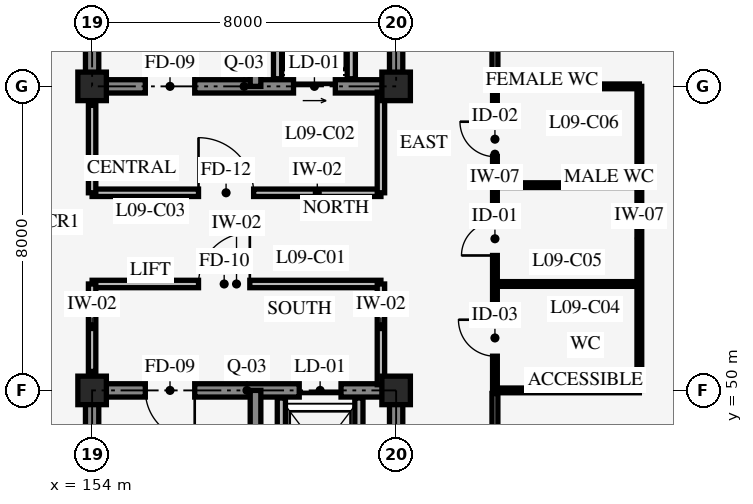
"""IFC4 building model, lengths in metres.
Left out: names, types, materials, properties, quantities, classifications, styles, units other than length and angle.
Written with IfcOpenShell. Run it as: python <this file> out.ifc"""

import sys

from ifc_helpers import new_model, si_unit, direction, frame, frame_2d, origin, origin_2d, place, context, subcontext, project, spatial, rectangle, extrude, element, fill, save


model = new_model("IFC4")
c1 = context("Model", 3, precision=1e-05, world=origin(), true_north=direction((0.0, 1.0)))
c2 = subcontext(c1, "Body", "Model", "MODEL_VIEW")
j1 = project(units=[si_unit("LENGTHUNIT", "METRE"), si_unit("PLANEANGLEUNIT", "RADIAN")], contexts=[c1])
p1 = place(None, origin())
s1 = spatial("IfcSite", under=j1, at=p1, CompositionType="ELEMENT")
p2 = place(p1, origin())
s2 = spatial("IfcBuilding", under=s1, at=p2, CompositionType="ELEMENT")
p3 = place(p2, frame((0.0, 0.0, 36.0)))
s3 = spatial("IfcBuildingStorey", under=s2, at=p3, CompositionType="ELEMENT", Elevation=36.0)
p4 = place(p3, frame((162.0, 42.0, 0.0), z_axis=(0.0, 0.0, 1.0), x_axis=(0.0, 1.0, 0.0)))
e1 = element("IfcWall", 1, at=p4, inside=s3, PredefinedType="SHEAR", context=c2, shape_type="SweptSolid", body=[
    extrude(rectangle(XDim=8.0, YDim=0.35, at=frame_2d((4.0, 0.0))), origin(), (0.0, 0.0, 1.0), 3.95),
])
p5 = place(p4, frame((3.175, 0.0, 0.0)))
e2 = element("IfcOpeningElement", 2, at=p5, cuts=e1, PredefinedType="OPENING", context=c2, shape_type="SweptSolid", body=[
    extrude(rectangle(XDim=1.05, YDim=2.2, at=frame_2d((0.525, 1.1))), frame((0.0, 0.185, 0.0), z_axis=(0.0, -1.0, 0.0), x_axis=(1.0, 0.0, 0.0)), (0.0, 0.0, 1.0), 0.37),
])
p6 = place(p3, frame((162.0, 50.0, 0.0), z_axis=(0.0, 0.0, 1.0), x_axis=(-1.0, 0.0, 0.0)))
e3 = element("IfcWall", 3, at=p6, inside=s3, PredefinedType="SHEAR", context=c2, shape_type="SweptSolid", body=[
    extrude(rectangle(XDim=8.0, YDim=0.35, at=frame_2d((4.0, 0.0))), origin(), (0.0, 0.0, 1.0), 3.95),
])
p7 = place(p6, frame((5.3, 0.0, 0.0)))
e4 = element("IfcOpeningElement", 4, at=p7, cuts=e3, PredefinedType="OPENING", context=c2, shape_type="SweptSolid", body=[
    extrude(rectangle(XDim=1.3, YDim=2.15, at=frame_2d((0.65, 1.075))), frame((0.0, 0.185, 0.0), z_axis=(0.0, -1.0, 0.0), x_axis=(1.0, 0.0, 0.0)), (0.0, 0.0, 1.0), 0.37),
])
p8 = place(p6, frame((1.45, 0.0, 0.0)))
e5 = element("IfcOpeningElement", 5, at=p8, cuts=e3, PredefinedType="OPENING", context=c2, shape_type="SweptSolid", body=[
    extrude(rectangle(XDim=1.1, YDim=2.2, at=frame_2d((0.55, 1.1))), frame((0.0, 0.185, 0.0), z_axis=(0.0, -1.0, 0.0), x_axis=(1.0, 0.0, 0.0)), (0.0, 0.0, 1.0), 0.37),
])
p9 = place(p3, frame((154.0, 50.0, 0.0), z_axis=(0.0, 0.0, 1.0), x_axis=(0.0, -1.0, 0.0)))
e6 = element("IfcWall", 6, at=p9, inside=s3, PredefinedType="SHEAR", context=c2, shape_type="SweptSolid", body=[
    extrude(rectangle(XDim=8.0, YDim=0.35, at=frame_2d((4.0, 0.0))), origin(), (0.0, 0.0, 1.0), 3.95),
])
p10 = place(p3, frame((158.3, 42.0, 0.0), z_axis=(0.0, 0.0, 1.0), x_axis=(0.0, 1.0, 0.0)))
e7 = element("IfcWall", 7, at=p10, inside=s3, PredefinedType="SHEAR", context=c2, shape_type="SweptSolid", body=[
    extrude(rectangle(XDim=8.0, YDim=0.28, at=frame_2d((4.0, 0.0))), origin(), (0.0, 0.0, 1.0), 3.95),
])
p11 = place(p3, frame((154.0, 58.0, 0.0), z_axis=(0.0, 0.0, 1.0), x_axis=(1.0, 0.0, 0.0)))
e8 = element("IfcWall", 8, at=p11, inside=s3, PredefinedType="SHEAR", context=c2, shape_type="SweptSolid", body=[
    extrude(rectangle(XDim=8.0, YDim=0.35, at=frame_2d((4.0, 0.0))), origin(), (0.0, 0.0, 1.0), 3.95),
])
p12 = place(p11, frame((1.4, 0.0, 0.0)))
e9 = element("IfcOpeningElement", 9, at=p12, cuts=e8, PredefinedType="OPENING", context=c2, shape_type="SweptSolid", body=[
    extrude(rectangle(XDim=1.3, YDim=2.15, at=frame_2d((0.65, 1.075))), frame((0.0, 0.185, 0.0), z_axis=(0.0, -1.0, 0.0), x_axis=(1.0, 0.0, 0.0)), (0.0, 0.0, 1.0), 0.37),
])
p13 = place(p11, frame((5.3, 0.0, 0.0)))
e10 = element("IfcOpeningElement", 10, at=p13, cuts=e8, PredefinedType="OPENING", context=c2, shape_type="SweptSolid", body=[
    extrude(rectangle(XDim=1.1, YDim=2.2, at=frame_2d((0.55, 1.1))), frame((0.0, 0.185, 0.0), z_axis=(0.0, -1.0, 0.0), x_axis=(1.0, 0.0, 0.0)), (0.0, 0.0, 1.0), 0.37),
])
p14 = place(p3, frame((162.0, 58.0, 0.0), z_axis=(0.0, 0.0, 1.0), x_axis=(0.0, 1.0, 0.0)))
e11 = element("IfcWall", 11, at=p14, inside=s3, PredefinedType="SHEAR", context=c2, shape_type="SweptSolid", body=[
    extrude(rectangle(XDim=8.0, YDim=0.35, at=frame_2d((4.0, 0.0))), origin(), (0.0, 0.0, 1.0), 3.95),
])
p15 = place(p14, frame((3.275, 0.0, 0.0)))
e12 = element("IfcOpeningElement", 12, at=p15, cuts=e11, PredefinedType="OPENING", context=c2, shape_type="SweptSolid", body=[
    extrude(rectangle(XDim=1.05, YDim=2.2, at=frame_2d((0.525, 1.1))), frame((0.0, 0.185, 0.0), z_axis=(0.0, -1.0, 0.0), x_axis=(1.0, 0.0, 0.0)), (0.0, 0.0, 1.0), 0.37),
])
p16 = place(p14, frame((5.45, 0.0, 0.0)))
e13 = element("IfcOpeningElement", 13, at=p16, cuts=e11, PredefinedType="OPENING", context=c2, shape_type="SweptSolid", body=[
    extrude(rectangle(XDim=1.4, YDim=2.3, at=frame_2d((0.7, 1.15))), frame((0.0, 0.185, 0.0), z_axis=(0.0, -1.0, 0.0), x_axis=(1.0, 0.0, 0.0)), (0.0, 0.0, 1.0), 0.37),
])
p17 = place(p3, frame((154.0, 66.0, 0.0), z_axis=(0.0, 0.0, 1.0), x_axis=(0.0, -1.0, 0.0)))
e14 = element("IfcWall", 14, at=p17, inside=s3, PredefinedType="SHEAR", context=c2, shape_type="SweptSolid", body=[
    extrude(rectangle(XDim=8.0, YDim=0.35, at=frame_2d((4.0, 0.0))), origin(), (0.0, 0.0, 1.0), 3.95),
])
p18 = place(p3, frame((158.3, 58.0, 0.0), z_axis=(0.0, 0.0, 1.0), x_axis=(0.0, 1.0, 0.0)))
e15 = element("IfcWall", 15, at=p18, inside=s3, PredefinedType="SHEAR", context=c2, shape_type="SweptSolid", body=[
    extrude(rectangle(XDim=8.0, YDim=0.28, at=frame_2d((4.0, 0.0))), origin(), (0.0, 0.0, 1.0), 3.95),
])
for number, where, z_axis, x_axis in (
    (16, (154.0, 50.0, 0.0), (0.0, 0.0, 1.0), (1.0, 0.0, 0.0)),
    (17, (154.0, 58.0, 0.0), (0.0, 0.0, 1.0), (1.0, 0.0, 0.0)),
    (18, (162.0, 50.0, 0.0), (0.0, 0.0, 1.0), (1.0, 0.0, 0.0)),
    (19, (162.0, 58.0, 0.0), (0.0, 0.0, 1.0), (1.0, 0.0, 0.0)),
):
    element("IfcColumn", number, at=place(p3, frame(where, z_axis=z_axis, x_axis=x_axis)), inside=s3, PredefinedType="COLUMN", context=c2, shape_type="SweptSolid", body=[
        extrude(rectangle(XDim=0.75, YDim=0.75, at=origin_2d()), origin(), (0.0, 0.0, 1.0), 4.2),
    ])
for number, where, z_axis, x_axis in (
    (20, (158.98, 47.02, 0.0), (0.0, 0.0, 1.0), (0.0, 1.0, 0.0)),
    (21, (161.02, 47.02, 0.0), (0.0, 0.0, 1.0), (0.0, 1.0, 0.0)),
):
    element("IfcWall", number, at=place(p3, frame(where, z_axis=z_axis, x_axis=x_axis)), inside=s3, PredefinedType="STANDARD", context=c2, shape_type="SweptSolid", body=[
        extrude(rectangle(XDim=2.78, YDim=0.215, at=frame_2d((1.39, 0.0))), origin(), (0.0, 0.0, 1.0), 3.9),
    ])
for number, where, z_axis, x_axis in (
    (22, (160.82, 58.2, 0.0), (0.0, 0.0, 1.0), (0.0, 1.0, 0.0)),
    (23, (158.88, 58.2, 0.0), (0.0, 0.0, 1.0), (0.0, 1.0, 0.0)),
):
    element("IfcWall", number, at=place(p3, frame(where, z_axis=z_axis, x_axis=x_axis)), inside=s3, PredefinedType="STANDARD", context=c2, shape_type="SweptSolid", body=[
        extrude(rectangle(XDim=2.55, YDim=0.215, at=frame_2d((1.275, 0.0))), origin(), (0.0, 0.0, 1.0), 3.9),
    ])
p19 = place(p3, frame((154.0, 52.8, 0.0), z_axis=(0.0, 0.0, 1.0), x_axis=(1.0, 0.0, 0.0)))
e24 = element("IfcWall", 24, at=p19, inside=s3, PredefinedType="STANDARD", context=c2, shape_type="SweptSolid", body=[
    extrude(rectangle(XDim=7.6, YDim=0.195, at=frame_2d((3.8, 0.0))), origin(), (0.0, 0.0, 1.0), 3.9),
])
p20 = place(p19, frame((2.8, 0.0, 0.0)))
e25 = element("IfcOpeningElement", 25, at=p20, cuts=e24, PredefinedType="OPENING", context=c2, shape_type="SweptSolid", body=[
    extrude(rectangle(XDim=1.35, YDim=2.15, at=frame_2d((0.675, 1.075))), frame((0.0, 0.107, 0.0), z_axis=(0.0, -1.0, 0.0), x_axis=(1.0, 0.0, 0.0)), (0.0, 0.0, 1.0), 0.215),
])
p21 = place(p3, frame((161.6, 50.15, 0.0), z_axis=(0.0, 0.0, 1.0), x_axis=(0.0, 1.0, 0.0)))
e26 = element("IfcWall", 26, at=p21, inside=s3, PredefinedType="STANDARD", context=c2, shape_type="SweptSolid", body=[
    extrude(rectangle(XDim=2.65, YDim=0.195, at=frame_2d((1.325, 0.0))), origin(), (0.0, 0.0, 1.0), 3.14),
])
p22 = place(p3, frame((154.0, 50.5, 0.0), z_axis=(0.0, 0.0, 1.0), x_axis=(0.0, 1.0, 0.0)))
e27 = element("IfcWall", 27, at=p22, inside=s3, PredefinedType="STANDARD", context=c2, shape_type="SweptSolid", body=[
    extrude(rectangle(XDim=2.3, YDim=0.195, at=frame_2d((1.15, 0.0))), origin(), (0.0, 0.0, 1.0), 3.14),
])
p23 = place(p3, frame((154.0, 55.2, 0.0), z_axis=(0.0, 0.0, 1.0), x_axis=(1.0, 0.0, 0.0)))
e28 = element("IfcWall", 28, at=p23, inside=s3, PredefinedType="STANDARD", context=c2, shape_type="SweptSolid", body=[
    extrude(rectangle(XDim=7.6, YDim=0.195, at=frame_2d((3.8, 0.0))), origin(), (0.0, 0.0, 1.0), 3.9),
])
p24 = place(p23, frame((2.8, 0.0, 0.0)))
e29 = element("IfcOpeningElement", 29, at=p24, cuts=e28, PredefinedType="OPENING", context=c2, shape_type="SweptSolid", body=[
    extrude(rectangle(XDim=1.45, YDim=2.2, at=frame_2d((0.725, 1.1))), frame((0.0, 0.107, 0.0), z_axis=(0.0, -1.0, 0.0), x_axis=(1.0, 0.0, 0.0)), (0.0, 0.0, 1.0), 0.215),
])
p25 = place(p3, frame((161.6, 55.2, 0.0), z_axis=(0.0, 0.0, 1.0), x_axis=(0.0, 1.0, 0.0)))
e30 = element("IfcWall", 30, at=p25, inside=s3, PredefinedType="STANDARD", context=c2, shape_type="SweptSolid", body=[
    extrude(rectangle(XDim=2.65, YDim=0.195, at=frame_2d((1.325, 0.0))), origin(), (0.0, 0.0, 1.0), 3.14),
])
p26 = place(p3, frame((154.0, 55.2, 0.0), z_axis=(0.0, 0.0, 1.0), x_axis=(0.0, 1.0, 0.0)))
e31 = element("IfcWall", 31, at=p26, inside=s3, PredefinedType="STANDARD", context=c2, shape_type="SweptSolid", body=[
    extrude(rectangle(XDim=2.3, YDim=0.195, at=frame_2d((1.15, 0.0))), origin(), (0.0, 0.0, 1.0), 3.14),
])
p27 = place(p3, frame((164.6, 50.0, 0.0), z_axis=(0.0, 0.0, 1.0), x_axis=(0.0, 1.0, 0.0)))
e32 = element("IfcWall", 32, at=p27, inside=s3, PredefinedType="STANDARD", context=c2, shape_type="SweptSolid", body=[
    extrude(rectangle(XDim=8.0, YDim=0.125, at=frame_2d((4.0, 0.0))), origin(), (0.0, 0.0, 1.0), 3.9),
])
p28 = place(p27, frame((0.9, 0.0, 0.0)))
e33 = element("IfcOpeningElement", 33, at=p28, cuts=e32, PredefinedType="OPENING", context=c2, shape_type="SweptSolid", body=[
    extrude(rectangle(XDim=0.96, YDim=2.08, at=frame_2d((0.48, 1.04))), frame((0.0, 0.073, 0.0), z_axis=(0.0, -1.0, 0.0), x_axis=(1.0, 0.0, 0.0)), (0.0, 0.0, 1.0), 0.145),
])
p29 = place(p27, frame((3.55, 0.0, 0.0)))
e34 = element("IfcOpeningElement", 34, at=p29, cuts=e32, PredefinedType="OPENING", context=c2, shape_type="SweptSolid", body=[
    extrude(rectangle(XDim=0.88, YDim=2.05, at=frame_2d((0.44, 1.025))), frame((0.0, 0.073, 0.0), z_axis=(0.0, -1.0, 0.0), x_axis=(1.0, 0.0, 0.0)), (0.0, 0.0, 1.0), 0.145),
])
p30 = place(p27, frame((6.15, 0.0, 0.0)))
e35 = element("IfcOpeningElement", 35, at=p30, cuts=e32, PredefinedType="OPENING", context=c2, shape_type="SweptSolid", body=[
    extrude(rectangle(XDim=0.92, YDim=2.05, at=frame_2d((0.46, 1.025))), frame((0.0, 0.073, 0.0), z_axis=(0.0, -1.0, 0.0), x_axis=(1.0, 0.0, 0.0)), (0.0, 0.0, 1.0), 0.145),
])
p31 = place(p3, frame((168.4, 50.0, 0.0), z_axis=(0.0, 0.0, 1.0), x_axis=(0.0, 1.0, 0.0)))
e36 = element("IfcWall", 36, at=p31, inside=s3, PredefinedType="STANDARD", context=c2, shape_type="SweptSolid", body=[
    extrude(rectangle(XDim=8.0, YDim=0.125, at=frame_2d((4.0, 0.0))), origin(), (0.0, 0.0, 1.0), 3.9),
])
p32 = place(p3, frame((164.6, 50.0, 0.0), z_axis=(0.0, 0.0, 1.0), x_axis=(1.0, 0.0, 0.0)))
e37 = element("IfcWall", 37, at=p32, inside=s3, PredefinedType="STANDARD", context=c2, shape_type="SweptSolid", body=[
    extrude(rectangle(XDim=3.8, YDim=0.125, at=frame_2d((1.9, 0.0))), origin(), (0.0, 0.0, 1.0), 3.09),
])
for number, where, z_axis, x_axis in (
    (38, (164.6, 52.8, 0.0), (0.0, 0.0, 1.0), (1.0, 0.0, 0.0)),
    (39, (164.6, 55.4, 0.0), (0.0, 0.0, 1.0), (1.0, 0.0, 0.0)),
):
    element("IfcWall", number, at=place(p3, frame(where, z_axis=z_axis, x_axis=x_axis)), inside=s3, PredefinedType="STANDARD", context=c2, shape_type="SweptSolid", body=[
        extrude(rectangle(XDim=3.8, YDim=0.125, at=frame_2d((1.9, 0.0))), origin(), (0.0, 0.0, 1.0), 3.9),
    ])
p33 = place(p3, frame((164.6, 58.0, 0.0), z_axis=(0.0, 0.0, 1.0), x_axis=(1.0, 0.0, 0.0)))
e40 = element("IfcWall", 40, at=p33, inside=s3, PredefinedType="STANDARD", context=c2, shape_type="SweptSolid", body=[
    extrude(rectangle(XDim=3.8, YDim=0.125, at=frame_2d((1.9, 0.0))), origin(), (0.0, 0.0, 1.0), 3.09),
])
p34 = place(p3, frame((164.6, 42.12, 0.0), z_axis=(0.0, 0.0, 1.0), x_axis=(0.0, 1.0, 0.0)))
e41 = element("IfcWall", 41, at=p34, inside=s3, PredefinedType="STANDARD", context=c2, shape_type="SweptSolid", body=[
    extrude(rectangle(XDim=7.8, YDim=0.155, at=frame_2d((3.9, 0.0))), origin(), (0.0, 0.0, 1.0), 3.9),
])
p35 = place(p34, frame((3.425, 0.0, 0.0)))
e42 = element("IfcOpeningElement", 42, at=p35, cuts=e41, PredefinedType="OPENING", context=c2, shape_type="SweptSolid", body=[
    extrude(rectangle(XDim=0.95, YDim=2.1, at=frame_2d((0.475, 1.05))), frame((0.0, 0.087, 0.0), z_axis=(0.0, -1.0, 0.0), x_axis=(1.0, 0.0, 0.0)), (0.0, 0.0, 1.0), 0.175),
])
p36 = place(p3, frame((164.6, 58.08, 0.0), z_axis=(0.0, 0.0, 1.0), x_axis=(0.0, 1.0, 0.0)))
e43 = element("IfcWall", 43, at=p36, inside=s3, PredefinedType="STANDARD", context=c2, shape_type="SweptSolid", body=[
    extrude(rectangle(XDim=7.8, YDim=0.155, at=frame_2d((3.9, 0.0))), origin(), (0.0, 0.0, 1.0), 3.9),
])
p37 = place(p36, frame((3.425, 0.0, 0.0)))
e44 = element("IfcOpeningElement", 44, at=p37, cuts=e43, PredefinedType="OPENING", context=c2, shape_type="SweptSolid", body=[
    extrude(rectangle(XDim=0.95, YDim=2.1, at=frame_2d((0.475, 1.05))), frame((0.0, 0.087, 0.0), z_axis=(0.0, -1.0, 0.0), x_axis=(1.0, 0.0, 0.0)), (0.0, 0.0, 1.0), 0.175),
])
p38 = place(p7, origin())
e45 = element("IfcDoor", 45, at=p38, inside=s3, OperationType="SINGLE_SWING_LEFT", PredefinedType="DOOR", context=c2, shape_type="SweptSolid", body=[
    extrude(rectangle(XDim=1.3, YDim=2.15, at=frame_2d((0.65, 1.075))), frame((0.0, 0.025, 0.0), z_axis=(0.0, -1.0, 0.0), x_axis=(1.0, 0.0, 0.0)), (0.0, 0.0, 1.0), 0.05),
])
fill(e4, e45)
p39 = place(p8, origin())
e46 = element("IfcDoor", 46, at=p39, inside=s3, OperationType="SLIDING_TO_LEFT", PredefinedType="DOOR", context=c2, shape_type="SweptSolid", body=[
    extrude(rectangle(XDim=1.1, YDim=2.2, at=frame_2d((0.55, 1.1))), frame((0.0, 0.025, 0.0), z_axis=(0.0, -1.0, 0.0), x_axis=(1.0, 0.0, 0.0)), (0.0, 0.0, 1.0), 0.05),
])
fill(e5, e46)
p40 = place(p12, origin())
e47 = element("IfcDoor", 47, at=p40, inside=s3, OperationType="SINGLE_SWING_RIGHT", PredefinedType="DOOR", context=c2, shape_type="SweptSolid", body=[
    extrude(rectangle(XDim=1.3, YDim=2.15, at=frame_2d((0.65, 1.075))), frame((0.0, 0.025, 0.0), z_axis=(0.0, -1.0, 0.0), x_axis=(1.0, 0.0, 0.0)), (0.0, 0.0, 1.0), 0.05),
])
fill(e9, e47)
p41 = place(p13, origin())
e48 = element("IfcDoor", 48, at=p41, inside=s3, OperationType="SLIDING_TO_RIGHT", PredefinedType="DOOR", context=c2, shape_type="SweptSolid", body=[
    extrude(rectangle(XDim=1.1, YDim=2.2, at=frame_2d((0.55, 1.1))), frame((0.0, 0.025, 0.0), z_axis=(0.0, -1.0, 0.0), x_axis=(1.0, 0.0, 0.0)), (0.0, 0.0, 1.0), 0.05),
])
fill(e10, e48)
p42 = place(p20, origin())
e49 = element("IfcDoor", 49, at=p42, inside=s3, OperationType="SINGLE_SWING_RIGHT", PredefinedType="DOOR", context=c2, shape_type="SweptSolid", body=[
    extrude(rectangle(XDim=1.35, YDim=2.15, at=frame_2d((0.675, 1.075))), frame((0.0, 0.025, 0.0), z_axis=(0.0, -1.0, 0.0), x_axis=(1.0, 0.0, 0.0)), (0.0, 0.0, 1.0), 0.05),
])
fill(e25, e49)
p43 = place(p24, origin())
e50 = element("IfcDoor", 50, at=p43, inside=s3, OperationType="SINGLE_SWING_LEFT", PredefinedType="DOOR", context=c2, shape_type="SweptSolid", body=[
    extrude(rectangle(XDim=1.45, YDim=2.2, at=frame_2d((0.725, 1.1))), frame((0.0, 0.025, 0.0), z_axis=(0.0, -1.0, 0.0), x_axis=(1.0, 0.0, 0.0)), (0.0, 0.0, 1.0), 0.05),
])
fill(e29, e50)
p44 = place(p28, origin())
e51 = element("IfcDoor", 51, at=p44, inside=s3, OperationType="SINGLE_SWING_RIGHT", PredefinedType="DOOR", context=c2, shape_type="SweptSolid", body=[
    extrude(rectangle(XDim=0.96, YDim=2.08, at=frame_2d((0.48, 1.04))), frame((0.0, 0.025, 0.0), z_axis=(0.0, -1.0, 0.0), x_axis=(1.0, 0.0, 0.0)), (0.0, 0.0, 1.0), 0.05),
])
fill(e33, e51)
p45 = place(p29, origin())
e52 = element("IfcDoor", 52, at=p45, inside=s3, OperationType="SINGLE_SWING_LEFT", PredefinedType="DOOR", context=c2, shape_type="SweptSolid", body=[
    extrude(rectangle(XDim=0.88, YDim=2.05, at=frame_2d((0.44, 1.025))), frame((0.0, 0.025, 0.0), z_axis=(0.0, -1.0, 0.0), x_axis=(1.0, 0.0, 0.0)), (0.0, 0.0, 1.0), 0.05),
])
fill(e34, e52)
p46 = place(p30, origin())
e53 = element("IfcDoor", 53, at=p46, inside=s3, OperationType="SINGLE_SWING_RIGHT", PredefinedType="DOOR", context=c2, shape_type="SweptSolid", body=[
    extrude(rectangle(XDim=0.92, YDim=2.05, at=frame_2d((0.46, 1.025))), frame((0.0, 0.025, 0.0), z_axis=(0.0, -1.0, 0.0), x_axis=(1.0, 0.0, 0.0)), (0.0, 0.0, 1.0), 0.05),
])
fill(e35, e53)
save(model, sys.argv[1])
